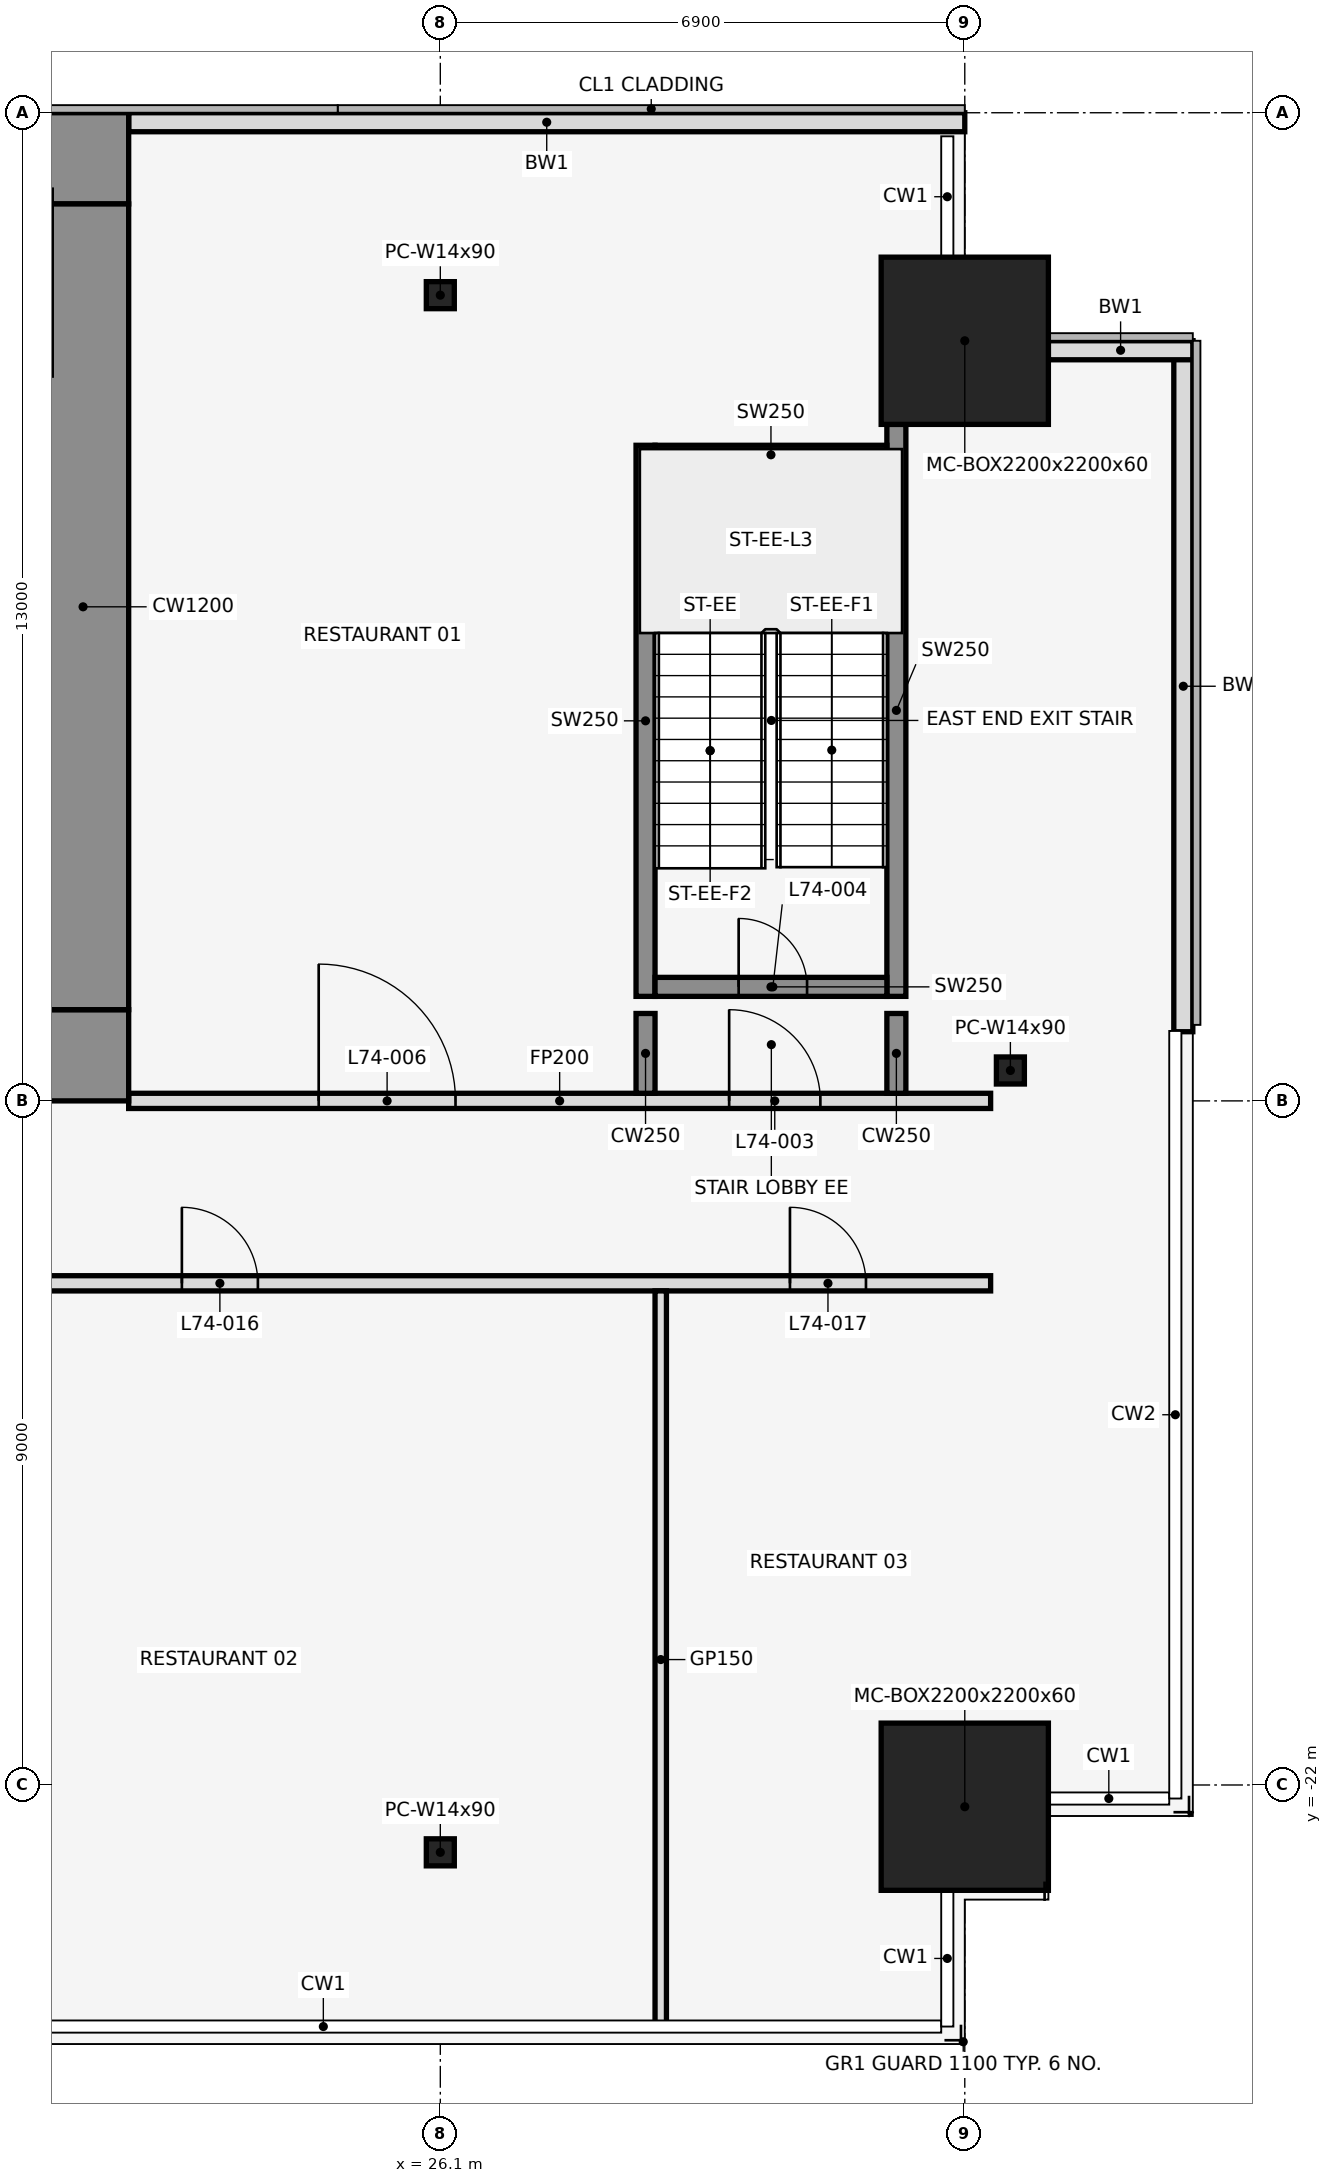
"""IFC4 building model, lengths in metres.
Left out: names, types, materials, properties, quantities, classifications, styles, units other than length and angle.
Written with IfcOpenShell. Run it as: python <this file> out.ifc"""

import sys

from ifc_helpers import new_model, si_unit, direction, frame, frame_2d, origin, origin_2d, place, context, subcontext, project, spatial, rectangle, hollow_rectangle, i_section, extrude, element, fill, save


model = new_model("IFC4")
c1 = context("Model", 3, precision=1e-05, world=origin(), true_north=direction((0.0, 1.0)))
c2 = subcontext(c1, "Body", "Model", "MODEL_VIEW")
j1 = project(units=[si_unit("LENGTHUNIT", "METRE"), si_unit("PLANEANGLEUNIT", "RADIAN")], contexts=[c1])
p1 = place(None, origin())
s1 = spatial("IfcSite", under=j1, at=p1, CompositionType="ELEMENT")
p2 = place(p1, origin())
s2 = spatial("IfcBuilding", under=s1, at=p2, CompositionType="ELEMENT")
p3 = place(p2, frame((0.0, 0.0, 329.0)))
s3 = spatial("IfcBuildingStorey", under=s2, at=p3, CompositionType="ELEMENT", Elevation=329.0)
for number, where, z_axis, x_axis in (
    (1, (26.1, -22.886, 0.0), (0.0, 0.0, 1.0), (1.0, 0.0, 0.0)),
    (2, (26.1, -2.4, 0.0), (0.0, 0.0, 1.0), (1.0, 0.0, 0.0)),
):
    element("IfcColumn", number, at=place(p3, frame(where, z_axis=z_axis, x_axis=x_axis)), inside=s3, PredefinedType="COLUMN", context=c2, shape_type="SweptSolid", body=[
        extrude(i_section(OverallWidth=0.368, OverallDepth=0.356, WebThickness=0.011, FlangeThickness=0.018, at=origin_2d()), origin(), (0.0, 0.0, 1.0), 4.5),
    ])
for number, where, z_axis, x_axis in (
    (3, (33.0, -22.286, 0.0), (0.0, 0.0, 1.0), (1.0, 0.0, 0.0)),
    (4, (33.0, -3.0, 0.0), (0.0, 0.0, 1.0), (1.0, 0.0, 0.0)),
):
    element("IfcColumn", number, at=place(p3, frame(where, z_axis=z_axis, x_axis=x_axis)), inside=s3, PredefinedType="COLUMN", context=c2, shape_type="SweptSolid", body=[
        extrude(hollow_rectangle(XDim=2.2, YDim=2.2, WallThickness=0.06, at=origin_2d()), origin(), (0.0, 0.0, 1.0), 4.5),
    ])
p4 = place(p3, frame((33.6, -12.6, 0.0), z_axis=(0.0, 0.0, 1.0), x_axis=(1.0, 0.0, 0.0)))
e5 = element("IfcColumn", 5, at=p4, inside=s3, PredefinedType="COLUMN", context=c2, shape_type="SweptSolid", body=[
    extrude(i_section(OverallWidth=0.368, OverallDepth=0.356, WebThickness=0.011, FlangeThickness=0.018, at=origin_2d()), origin(), (0.0, 0.0, 1.0), 4.5),
])
p5 = place(p3, frame((33.0, -0.125, 0.0), z_axis=(0.0, 0.0, 1.0), x_axis=(-1.0, 0.0, 0.0)))
e6 = element("IfcWall", 6, at=p5, inside=s3, PredefinedType="STANDARD", context=c2, shape_type="SweptSolid", body=[
    extrude(rectangle(XDim=11.0, YDim=0.25, at=frame_2d((5.5, 0.0))), origin(), (0.0, 0.0, 1.0), 4.35),
])
p6 = place(p3, frame((35.875, -12.09, 0.0), z_axis=(0.0, 0.0, 1.0), x_axis=(0.0, 1.0, 0.0)))
e7 = element("IfcWall", 7, at=p6, inside=s3, PredefinedType="STANDARD", context=c2, shape_type="SweptSolid", body=[
    extrude(rectangle(XDim=9.09, YDim=0.25, at=frame_2d((4.545, 0.0))), origin(), (0.0, 0.0, 1.0), 4.35),
])
p7 = place(p3, frame((36.0, -3.125, 0.0), z_axis=(0.0, 0.0, 1.0), x_axis=(-1.0, 0.0, 0.0)))
e8 = element("IfcWall", 8, at=p7, inside=s3, PredefinedType="STANDARD", context=c2, shape_type="SweptSolid", body=[
    extrude(rectangle(XDim=1.9, YDim=0.25, at=frame_2d((0.95, 0.0))), origin(), (0.0, 0.0, 1.0), 4.35),
])
p8 = place(p3, frame((28.8, -11.625, 0.0), z_axis=(0.0, 0.0, 1.0), x_axis=(0.0, 1.0, 0.0)))
e9 = element("IfcWall", 9, at=p8, inside=s3, PredefinedType="SHEAR", context=c2, shape_type="SweptSolid", body=[
    extrude(rectangle(XDim=7.25, YDim=0.25, at=frame_2d((3.625, 0.0))), origin(), (0.0, 0.0, 1.0), 4.5),
])
p9 = place(p3, frame((32.1, -11.625, 0.0), z_axis=(0.0, 0.0, 1.0), x_axis=(0.0, 1.0, 0.0)))
e10 = element("IfcWall", 10, at=p9, inside=s3, PredefinedType="SHEAR", context=c2, shape_type="SweptSolid", body=[
    extrude(rectangle(XDim=7.525, YDim=0.25, at=frame_2d((3.762, 0.0))), origin(), (0.0, 0.0, 1.0), 4.5),
])
p10 = place(p3, frame((28.925, -11.5, 0.0), z_axis=(0.0, 0.0, 1.0), x_axis=(1.0, 0.0, 0.0)))
e11 = element("IfcWall", 11, at=p10, inside=s3, PredefinedType="SHEAR", context=c2, shape_type="SweptSolid", body=[
    extrude(rectangle(XDim=3.05, YDim=0.25, at=frame_2d((1.525, 0.0))), origin(), (0.0, 0.0, 1.0), 4.5),
])
p11 = place(p10, frame((1.1, 0.0, 0.0)))
e12 = element("IfcOpeningElement", 12, at=p11, cuts=e11, PredefinedType="OPENING", context=c2, shape_type="SweptSolid", body=[
    extrude(rectangle(XDim=0.9, YDim=2.1, at=frame_2d((0.45, 1.05))), frame((0.0, 0.137, 0.0), z_axis=(0.0, -1.0, 0.0), x_axis=(1.0, 0.0, 0.0)), (0.0, 0.0, 1.0), 0.274),
])
p12 = place(p3, frame((28.925, -4.5, 0.0), z_axis=(0.0, 0.0, 1.0), x_axis=(1.0, 0.0, 0.0)))
e13 = element("IfcWall", 13, at=p12, inside=s3, PredefinedType="SHEAR", context=c2, shape_type="SweptSolid", body=[
    extrude(rectangle(XDim=3.05, YDim=0.25, at=frame_2d((1.525, 0.0))), origin(), (0.0, 0.0, 1.0), 4.5),
])
p13 = place(p3, frame((1.4, -15.4, 0.0), z_axis=(0.0, 0.0, 1.0), x_axis=(1.0, 0.0, 0.0)))
e14 = element("IfcWall", 14, at=p13, inside=s3, PredefinedType="PARTITIONING", context=c2, shape_type="SweptSolid", body=[
    extrude(rectangle(XDim=31.94, YDim=0.2, at=frame_2d((15.97, 0.0))), origin(), (0.0, 0.0, 1.0), 3.418),
])
p14 = place(p13, frame((1.7, 0.0, 0.0)))
e15 = element("IfcOpeningElement", 15, at=p14, cuts=e14, PredefinedType="OPENING", context=c2, shape_type="SweptSolid", body=[
    extrude(rectangle(XDim=1.0, YDim=2.1, at=frame_2d((0.5, 1.05))), frame((0.0, 0.112, 0.0), z_axis=(0.0, -1.0, 0.0), x_axis=(1.0, 0.0, 0.0)), (0.0, 0.0, 1.0), 0.224),
])
p15 = place(p13, frame((9.7, 0.0, 0.0)))
e16 = element("IfcOpeningElement", 16, at=p15, cuts=e14, PredefinedType="OPENING", context=c2, shape_type="SweptSolid", body=[
    extrude(rectangle(XDim=1.0, YDim=2.1, at=frame_2d((0.5, 1.05))), frame((0.0, 0.112, 0.0), z_axis=(0.0, -1.0, 0.0), x_axis=(1.0, 0.0, 0.0)), (0.0, 0.0, 1.0), 0.224),
])
p16 = place(p13, frame((21.3, 0.0, 0.0)))
e17 = element("IfcOpeningElement", 17, at=p16, cuts=e14, PredefinedType="OPENING", context=c2, shape_type="SweptSolid", body=[
    extrude(rectangle(XDim=1.0, YDim=2.1, at=frame_2d((0.5, 1.05))), frame((0.0, 0.112, 0.0), z_axis=(0.0, -1.0, 0.0), x_axis=(1.0, 0.0, 0.0)), (0.0, 0.0, 1.0), 0.224),
])
p17 = place(p13, frame((29.3, 0.0, 0.0)))
e18 = element("IfcOpeningElement", 18, at=p17, cuts=e14, PredefinedType="OPENING", context=c2, shape_type="SweptSolid", body=[
    extrude(rectangle(XDim=1.0, YDim=2.1, at=frame_2d((0.5, 1.05))), frame((0.0, 0.112, 0.0), z_axis=(0.0, -1.0, 0.0), x_axis=(1.0, 0.0, 0.0)), (0.0, 0.0, 1.0), 0.224),
])
p18 = place(p3, frame((22.0, -13.0, 0.0), z_axis=(0.0, 0.0, 1.0), x_axis=(1.0, 0.0, 0.0)))
e19 = element("IfcWall", 19, at=p18, inside=s3, PredefinedType="PARTITIONING", context=c2, shape_type="SweptSolid", body=[
    extrude(rectangle(XDim=11.34, YDim=0.2, at=frame_2d((5.67, 0.0))), origin(), (0.0, 0.0, 1.0), 3.418),
])
p19 = place(p18, frame((7.9, 0.0, 0.0)))
e20 = element("IfcOpeningElement", 20, at=p19, cuts=e19, PredefinedType="OPENING", context=c2, shape_type="SweptSolid", body=[
    extrude(rectangle(XDim=1.2, YDim=2.1, at=frame_2d((0.6, 1.05))), frame((0.0, 0.112, 0.0), z_axis=(0.0, -1.0, 0.0), x_axis=(1.0, 0.0, 0.0)), (0.0, 0.0, 1.0), 0.224),
])
p20 = place(p18, frame((2.5, 0.0, 0.0)))
e21 = element("IfcOpeningElement", 21, at=p20, cuts=e19, PredefinedType="OPENING", context=c2, shape_type="SweptSolid", body=[
    extrude(rectangle(XDim=1.8, YDim=2.1, at=frame_2d((0.9, 1.05))), frame((0.0, 0.112, 0.0), z_axis=(0.0, -1.0, 0.0), x_axis=(1.0, 0.0, 0.0)), (0.0, 0.0, 1.0), 0.224),
])
p21 = place(p3, frame((28.8, -12.9, 0.0), z_axis=(0.0, 0.0, 1.0), x_axis=(0.0, 1.0, 0.0)))
e22 = element("IfcWall", 22, at=p21, inside=s3, PredefinedType="SHEAR", context=c2, shape_type="SweptSolid", body=[
    extrude(rectangle(XDim=1.05, YDim=0.25, at=frame_2d((0.525, 0.0))), origin(), (0.0, 0.0, 1.0), 4.5),
])
p22 = place(p3, frame((29.0, -25.2, 0.0), z_axis=(0.0, 0.0, 1.0), x_axis=(0.0, 1.0, 0.0)))
e23 = element("IfcWall", 23, at=p22, inside=s3, PredefinedType="PARTITIONING", context=c2, shape_type="SweptSolid", body=[
    extrude(rectangle(XDim=9.7, YDim=0.15, at=frame_2d((4.85, 0.0))), origin(), (0.0, 0.0, 1.0), 3.418),
])
p23 = place(p3, frame((32.1, -12.9, 0.0), z_axis=(0.0, 0.0, 1.0), x_axis=(0.0, 1.0, 0.0)))
e24 = element("IfcWall", 24, at=p23, inside=s3, PredefinedType="SHEAR", context=c2, shape_type="SweptSolid", body=[
    extrude(rectangle(XDim=1.05, YDim=0.25, at=frame_2d((0.525, 0.0))), origin(), (0.0, 0.0, 1.0), 4.5),
])
p24 = place(p3, frame((-22.0, -0.6, 0.0), z_axis=(0.0, 0.0, 1.0), x_axis=(1.0, 0.0, 0.0)))
e25 = element("IfcWall", 25, at=p24, inside=s3, PredefinedType="SHEAR", context=c2, shape_type="SweptSolid", body=[
    extrude(rectangle(XDim=44.0, YDim=1.2, at=frame_2d((22.0, 0.0))), origin(), (0.0, 0.0, 1.0), 4.5),
])
p25 = place(p24, frame((18.55, 0.0, 0.0)))
e26 = element("IfcOpeningElement", 26, at=p25, cuts=e25, PredefinedType="OPENING", context=c2, shape_type="SweptSolid", body=[
    extrude(rectangle(XDim=0.9, YDim=2.1, at=frame_2d((0.45, 1.05))), frame((0.0, 0.612, 0.0), z_axis=(0.0, -1.0, 0.0), x_axis=(1.0, 0.0, 0.0)), (0.0, 0.0, 1.0), 1.224),
])
p26 = place(p24, frame((24.55, 0.0, 0.0)))
e27 = element("IfcOpeningElement", 27, at=p26, cuts=e25, PredefinedType="OPENING", context=c2, shape_type="SweptSolid", body=[
    extrude(rectangle(XDim=0.9, YDim=2.1, at=frame_2d((0.45, 1.05))), frame((0.0, 0.612, 0.0), z_axis=(0.0, -1.0, 0.0), x_axis=(1.0, 0.0, 0.0)), (0.0, 0.0, 1.0), 1.224),
])
p27 = place(p3, frame((-22.0, -12.4, 0.0), z_axis=(0.0, 0.0, 1.0), x_axis=(1.0, 0.0, 0.0)))
e28 = element("IfcWall", 28, at=p27, inside=s3, PredefinedType="SHEAR", context=c2, shape_type="SweptSolid", body=[
    extrude(rectangle(XDim=44.0, YDim=1.2, at=frame_2d((22.0, 0.0))), origin(), (0.0, 0.0, 1.0), 4.5),
])
p28 = place(p27, frame((2.2, 0.0, 0.0)))
e29 = element("IfcOpeningElement", 29, at=p28, cuts=e28, PredefinedType="OPENING", context=c2, shape_type="SweptSolid", body=[
    extrude(rectangle(XDim=1.2, YDim=2.1, at=frame_2d((0.6, 1.05))), frame((0.0, 0.612, 0.0), z_axis=(0.0, -1.0, 0.0), x_axis=(1.0, 0.0, 0.0)), (0.0, 0.0, 1.0), 1.224),
])
p29 = place(p27, frame((21.4, 0.0, 0.0)))
e30 = element("IfcOpeningElement", 30, at=p29, cuts=e28, PredefinedType="OPENING", context=c2, shape_type="SweptSolid", body=[
    extrude(rectangle(XDim=1.2, YDim=2.1, at=frame_2d((0.6, 1.05))), frame((0.0, 0.612, 0.0), z_axis=(0.0, -1.0, 0.0), x_axis=(1.0, 0.0, 0.0)), (0.0, 0.0, 1.0), 1.224),
])
p30 = place(p27, frame((40.6, 0.0, 0.0)))
e31 = element("IfcOpeningElement", 31, at=p30, cuts=e28, PredefinedType="OPENING", context=c2, shape_type="SweptSolid", body=[
    extrude(rectangle(XDim=1.2, YDim=2.1, at=frame_2d((0.6, 1.05))), frame((0.0, 0.612, 0.0), z_axis=(0.0, -1.0, 0.0), x_axis=(1.0, 0.0, 0.0)), (0.0, 0.0, 1.0), 1.224),
])
p31 = place(p27, frame((16.0, 0.0, 0.0)))
e32 = element("IfcOpeningElement", 32, at=p31, cuts=e28, PredefinedType="OPENING", context=c2, shape_type="SweptSolid", body=[
    extrude(rectangle(XDim=1.8, YDim=2.1, at=frame_2d((0.9, 1.05))), frame((0.0, 0.612, 0.0), z_axis=(0.0, -1.0, 0.0), x_axis=(1.0, 0.0, 0.0)), (0.0, 0.0, 1.0), 1.224),
])
p32 = place(p27, frame((6.3, 0.0, 0.0)))
e33 = element("IfcOpeningElement", 33, at=p32, cuts=e28, PredefinedType="OPENING", context=c2, shape_type="SweptSolid", body=[
    extrude(rectangle(XDim=1.2, YDim=2.1, at=frame_2d((0.6, 1.05))), frame((0.0, 0.612, 0.0), z_axis=(0.0, -1.0, 0.0), x_axis=(1.0, 0.0, 0.0)), (0.0, 0.0, 1.0), 1.224),
])
p33 = place(p27, frame((26.2, 0.0, 0.0)))
e34 = element("IfcOpeningElement", 34, at=p33, cuts=e28, PredefinedType="OPENING", context=c2, shape_type="SweptSolid", body=[
    extrude(rectangle(XDim=1.8, YDim=2.1, at=frame_2d((0.9, 1.05))), frame((0.0, 0.612, 0.0), z_axis=(0.0, -1.0, 0.0), x_axis=(1.0, 0.0, 0.0)), (0.0, 0.0, 1.0), 1.224),
])
p34 = place(p27, frame((36.5, 0.0, 0.0)))
e35 = element("IfcOpeningElement", 35, at=p34, cuts=e28, PredefinedType="OPENING", context=c2, shape_type="SweptSolid", body=[
    extrude(rectangle(XDim=1.2, YDim=2.1, at=frame_2d((0.6, 1.05))), frame((0.0, 0.612, 0.0), z_axis=(0.0, -1.0, 0.0), x_axis=(1.0, 0.0, 0.0)), (0.0, 0.0, 1.0), 1.224),
])
p35 = place(p3, frame((21.4, -11.8, 0.0), z_axis=(0.0, 0.0, 1.0), x_axis=(0.0, 1.0, 0.0)))
e36 = element("IfcWall", 36, at=p35, inside=s3, PredefinedType="SHEAR", context=c2, shape_type="SweptSolid", body=[
    extrude(rectangle(XDim=10.6, YDim=1.2, at=frame_2d((5.3, 0.0))), origin(), (0.0, 0.0, 1.0), 4.5),
])
p36 = place(p19, origin())
e37 = element("IfcDoor", 37, at=p36, inside=s3, OperationType="SINGLE_SWING_RIGHT", PredefinedType="DOOR", context=c2, shape_type="SweptSolid", body=[
    extrude(rectangle(XDim=1.2, YDim=2.1, at=frame_2d((0.6, 1.05))), frame((0.0, 0.025, 0.0), z_axis=(0.0, -1.0, 0.0), x_axis=(1.0, 0.0, 0.0)), (0.0, 0.0, 1.0), 0.05),
])
fill(e20, e37)
p37 = place(p11, origin())
e38 = element("IfcDoor", 38, at=p37, inside=s3, OperationType="SINGLE_SWING_LEFT", PredefinedType="DOOR", context=c2, shape_type="SweptSolid", body=[
    extrude(rectangle(XDim=0.9, YDim=2.1, at=frame_2d((0.45, 1.05))), frame((0.0, 0.025, 0.0), z_axis=(0.0, -1.0, 0.0), x_axis=(1.0, 0.0, 0.0)), (0.0, 0.0, 1.0), 0.05),
])
fill(e12, e38)
p38 = place(p20, origin())
e39 = element("IfcDoor", 39, at=p38, inside=s3, OperationType="SINGLE_SWING_LEFT", PredefinedType="DOOR", context=c2, shape_type="SweptSolid", body=[
    extrude(rectangle(XDim=1.8, YDim=2.1, at=frame_2d((0.9, 1.05))), frame((0.0, 0.025, 0.0), z_axis=(0.0, -1.0, 0.0), x_axis=(1.0, 0.0, 0.0)), (0.0, 0.0, 1.0), 0.05),
])
fill(e21, e39)
p39 = place(p16, frame((1.0, 0.0, 0.0), z_axis=(0.0, 0.0, 1.0), x_axis=(-1.0, 0.0, 0.0)))
e40 = element("IfcDoor", 40, at=p39, inside=s3, OperationType="SINGLE_SWING_LEFT", PredefinedType="DOOR", context=c2, shape_type="SweptSolid", body=[
    extrude(rectangle(XDim=1.0, YDim=2.1, at=frame_2d((0.5, 1.05))), frame((0.0, 0.025, 0.0), z_axis=(0.0, -1.0, 0.0), x_axis=(1.0, 0.0, 0.0)), (0.0, 0.0, 1.0), 0.05),
])
fill(e17, e40)
p40 = place(p17, frame((1.0, 0.0, 0.0), z_axis=(0.0, 0.0, 1.0), x_axis=(-1.0, 0.0, 0.0)))
e41 = element("IfcDoor", 41, at=p40, inside=s3, OperationType="SINGLE_SWING_RIGHT", PredefinedType="DOOR", context=c2, shape_type="SweptSolid", body=[
    extrude(rectangle(XDim=1.0, YDim=2.1, at=frame_2d((0.5, 1.05))), frame((0.0, 0.025, 0.0), z_axis=(0.0, -1.0, 0.0), x_axis=(1.0, 0.0, 0.0)), (0.0, 0.0, 1.0), 0.05),
])
fill(e18, e41)
save(model, sys.argv[1])
